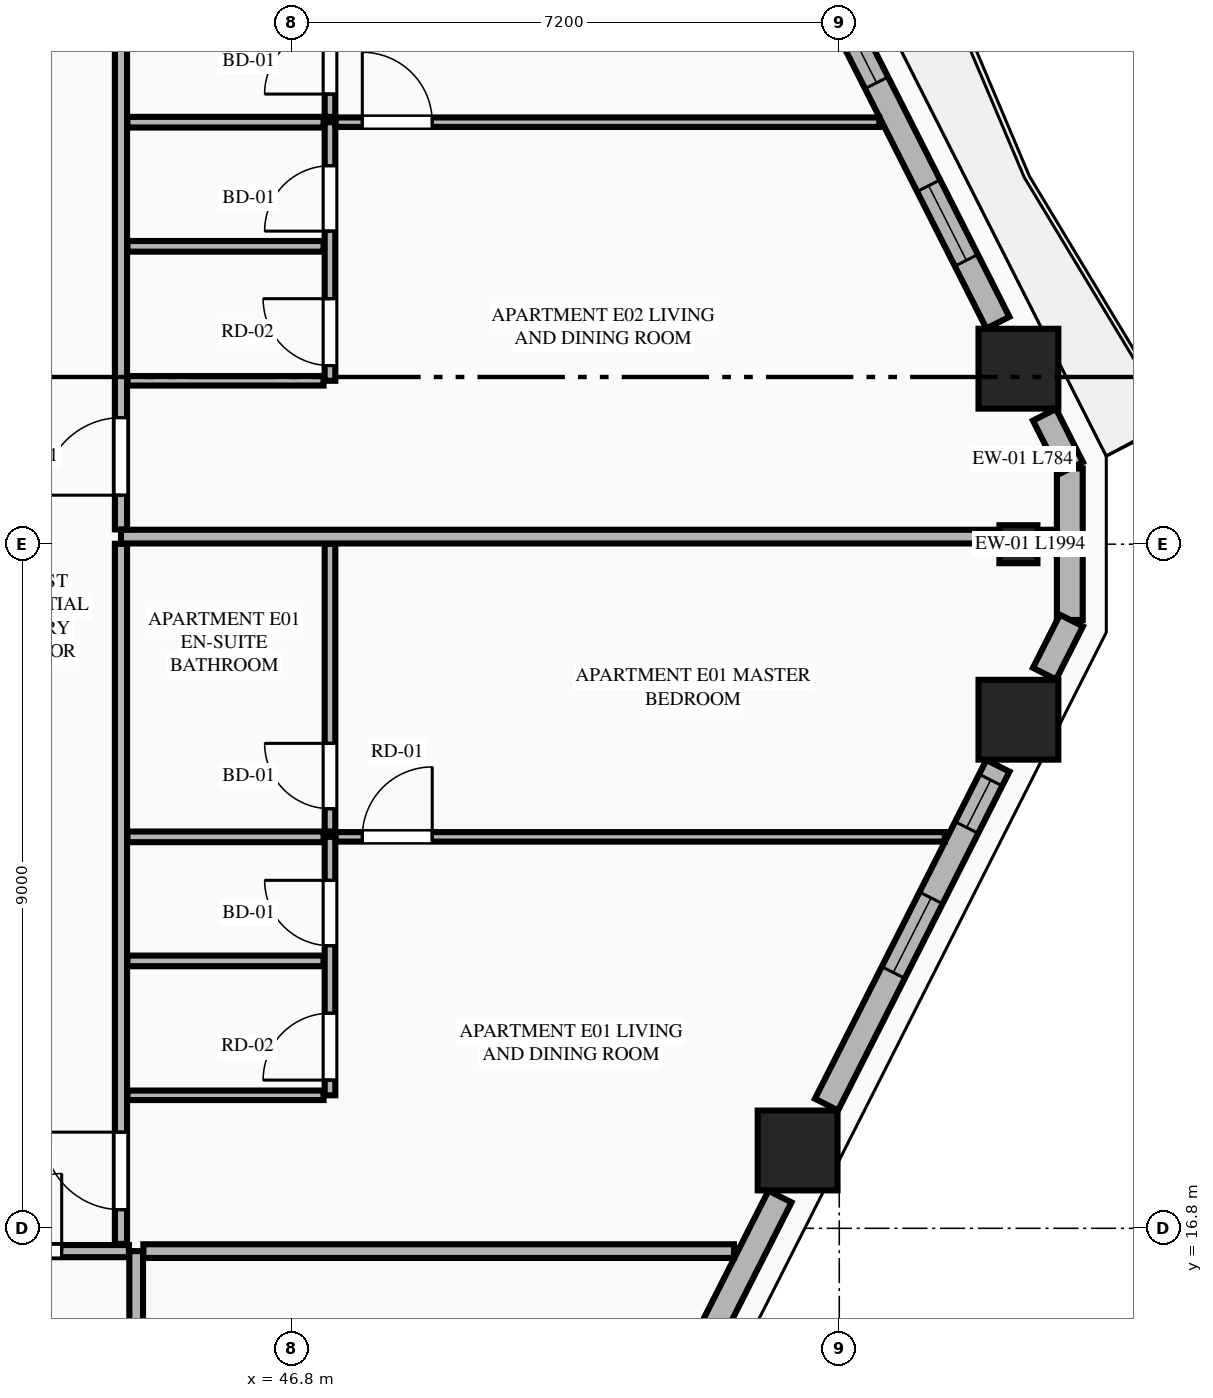
"""IFC4 building model, lengths in metres.
Left out: names, types, materials, properties, quantities, classifications, styles, units other than length and angle.
Written with IfcOpenShell. Run it as: python <this file> out.ifc"""

import sys

from ifc_helpers import new_model, si_unit, direction, frame, frame_2d, origin, origin_2d, place, context, subcontext, project, spatial, rectangle, extrude, element, fill, save


model = new_model("IFC4")
c1 = context("Model", 3, precision=1e-05, world=origin(), true_north=direction((0.0, 1.0)))
c2 = subcontext(c1, "Body", "Model", "MODEL_VIEW")
j1 = project(units=[si_unit("LENGTHUNIT", "METRE"), si_unit("PLANEANGLEUNIT", "RADIAN")], contexts=[c1])
p1 = place(None, origin())
s1 = spatial("IfcSite", under=j1, at=p1, CompositionType="ELEMENT")
p2 = place(p1, origin())
s2 = spatial("IfcBuilding", under=s1, at=p2, CompositionType="ELEMENT")
p3 = place(p2, frame((0.0, 0.0, 133.9)))
s3 = spatial("IfcBuildingStorey", under=s2, at=p3, CompositionType="ELEMENT", Elevation=133.9)
for number, where, z_axis, x_axis in (
    (1, (53.452, 17.824, 0.0), (0.0, 0.0, 1.0), (1.0, 0.0, 0.0)),
    (2, (56.357, 23.491, 0.0), (0.0, 0.0, 1.0), (1.0, 0.0, 0.0)),
    (3, (56.357, 28.109, 0.0), (0.0, 0.0, 1.0), (1.0, 0.0, 0.0)),
):
    element("IfcColumn", number, at=place(p3, frame(where, z_axis=z_axis, x_axis=x_axis)), inside=s3, PredefinedType="COLUMN", context=c2, shape_type="SweptSolid", body=[
        extrude(rectangle(XDim=1.05, YDim=1.05, at=origin_2d()), origin(), (0.0, 0.0, 1.0), 3.55),
    ])
p4 = place(p3, frame((56.357, 25.8, 0.0), z_axis=(0.0, 0.0, 1.0), x_axis=(0.0, 1.0, 0.0)))
e4 = element("IfcColumn", 4, at=p4, inside=s3, PredefinedType="PILASTER", context=c2, shape_type="SweptSolid", body=[
    extrude(rectangle(XDim=0.5, YDim=0.35, at=origin_2d()), origin(), (0.0, 0.0, 1.0), 3.55),
])
p5 = place(p3, frame((57.033, 24.803, 0.0), z_axis=(0.0, 0.0, 1.0), x_axis=(0.0, 1.0, 0.0)))
e5 = element("IfcWall", 5, at=p5, inside=s3, PredefinedType="STANDARD", context=c2, shape_type="SweptSolid", body=[
    extrude(rectangle(XDim=1.994, YDim=0.34, at=frame_2d((0.997, 0.0))), origin(), (0.0, 0.0, 1.0), 3.34),
])
p6 = place(p3, frame((50.863, 12.561, 0.0), z_axis=(0.0, 0.0, 1.0), x_axis=(0.451567731634, 0.892236842855, 0.0)))
e6 = element("IfcWall", 6, at=p6, inside=s3, PredefinedType="STANDARD", context=c2, shape_type="SweptSolid", body=[
    extrude(rectangle(XDim=5.219, YDim=0.34, at=frame_2d((2.61, 0.0))), origin(), (0.0, 0.0, 1.0), 2.797),
])
p7 = place(p6, frame((2.06, 0.0, 0.75)))
e7 = element("IfcOpeningElement", 7, at=p7, cuts=e6, PredefinedType="OPENING", context=c2, shape_type="SweptSolid", body=[
    extrude(rectangle(XDim=1.1, YDim=1.897, at=frame_2d((0.55, 0.948))), frame((0.0, 0.18, 0.0), z_axis=(0.0, -1.0, 0.0), x_axis=(1.0, 0.0, 0.0)), (0.0, 0.0, 1.0), 0.36),
])
p8 = place(p3, frame((53.832, 18.428, 0.0), z_axis=(0.0, 0.0, 1.0), x_axis=(0.451431617681, 0.892305718102, 0.0)))
e8 = element("IfcWall", 8, at=p8, inside=s3, PredefinedType="STANDARD", context=c2, shape_type="SweptSolid", body=[
    extrude(rectangle(XDim=4.995, YDim=0.34, at=frame_2d((2.498, 0.0))), origin(), (0.0, 0.0, 1.0), 2.797),
])
p9 = place(p8, frame((1.947, 0.0, 0.75)))
e9 = element("IfcOpeningElement", 9, at=p9, cuts=e8, PredefinedType="OPENING", context=c2, shape_type="SweptSolid", body=[
    extrude(rectangle(XDim=1.1, YDim=1.897, at=frame_2d((0.55, 0.948))), frame((0.0, 0.18, 0.0), z_axis=(0.0, -1.0, 0.0), x_axis=(1.0, 0.0, 0.0)), (0.0, 0.0, 1.0), 0.36),
])
p10 = place(p8, frame((4.085, 0.0, 0.75)))
e10 = element("IfcOpeningElement", 10, at=p10, cuts=e8, PredefinedType="OPENING", context=c2, shape_type="SweptSolid", body=[
    extrude(rectangle(XDim=0.7, YDim=1.897, at=frame_2d((0.35, 0.948))), frame((0.0, 0.18, 0.0), z_axis=(0.0, -1.0, 0.0), x_axis=(1.0, 0.0, 0.0)), (0.0, 0.0, 1.0), 0.36),
])
for number, where, z_axis, x_axis in (
    (11, (56.7, 24.097, 0.0), (0.0, 0.0, 1.0), (0.452, 0.892, 0.0)),
    (12, (57.054, 26.804, 0.0), (0.0, 0.0, 1.0), (-0.452, 0.892, 0.0)),
):
    element("IfcWall", number, at=place(p3, frame(where, z_axis=z_axis, x_axis=x_axis)), inside=s3, PredefinedType="STANDARD", context=c2, shape_type="SweptSolid", body=[
        extrude(rectangle(XDim=0.783, YDim=0.34, at=frame_2d((0.392, 0.0))), origin(), (0.0, 0.0, 1.0), 3.34),
    ])
p11 = place(p3, frame((56.087, 28.715, 0.0), z_axis=(0.0, 0.0, 1.0), x_axis=(-0.451431617681, 0.892305718102, 0.0)))
e13 = element("IfcWall", 13, at=p11, inside=s3, PredefinedType="STANDARD", context=c2, shape_type="SweptSolid", body=[
    extrude(rectangle(XDim=4.995, YDim=0.34, at=frame_2d((2.498, 0.0))), origin(), (0.0, 0.0, 1.0), 2.797),
])
p12 = place(p11, frame((0.919, 0.0, 0.75)))
e14 = element("IfcOpeningElement", 14, at=p12, cuts=e13, PredefinedType="OPENING", context=c2, shape_type="SweptSolid", body=[
    extrude(rectangle(XDim=1.1, YDim=1.897, at=frame_2d((0.55, 0.948))), frame((0.0, 0.18, 0.0), z_axis=(0.0, -1.0, 0.0), x_axis=(1.0, 0.0, 0.0)), (0.0, 0.0, 1.0), 0.36),
])
p13 = place(p11, frame((3.536, 0.0, 0.75)))
e15 = element("IfcOpeningElement", 15, at=p13, cuts=e13, PredefinedType="OPENING", context=c2, shape_type="SweptSolid", body=[
    extrude(rectangle(XDim=1.1, YDim=1.897, at=frame_2d((0.55, 0.948))), frame((0.0, 0.18, 0.0), z_axis=(0.0, -1.0, 0.0), x_axis=(1.0, 0.0, 0.0)), (0.0, 0.0, 1.0), 0.36),
])
p14 = place(p3, frame((44.75, 4.105, 0.0), z_axis=(0.0, 0.0, 1.0), x_axis=(0.0, 1.0, 0.0)))
e16 = element("IfcWall", 16, at=p14, inside=s3, PredefinedType="PARTITIONING", context=c2, shape_type="SweptSolid", body=[
    extrude(rectangle(XDim=12.395, YDim=0.18, at=frame_2d((6.198, 0.0))), origin(), (0.0, 0.0, 1.0), 3.34),
])
p15 = place(p3, frame((28.663, 16.5, 0.0), z_axis=(0.0, 0.0, 1.0), x_axis=(1.0, 0.0, 0.0)))
e17 = element("IfcWall", 17, at=p15, inside=s3, PredefinedType="PARTITIONING", context=c2, shape_type="SweptSolid", body=[
    extrude(rectangle(XDim=15.992, YDim=0.16, at=frame_2d((7.996, 0.0))), origin(), (0.0, 0.0, 1.0), 3.34),
])
p16 = place(p15, frame((14.087, 0.0, 0.0)))
e18 = element("IfcOpeningElement", 18, at=p16, cuts=e17, PredefinedType="OPENING", context=c2, shape_type="SweptSolid", body=[
    extrude(rectangle(XDim=1.02, YDim=2.25, at=frame_2d((0.51, 1.125))), frame((0.0, 0.09, 0.0), z_axis=(0.0, -1.0, 0.0), x_axis=(1.0, 0.0, 0.0)), (0.0, 0.0, 1.0), 0.18),
])
p17 = place(p3, frame((44.845, 16.5, 0.0), z_axis=(0.0, 0.0, 1.0), x_axis=(1.0, 0.0, 0.0)))
e19 = element("IfcWall", 19, at=p17, inside=s3, PredefinedType="PARTITIONING", context=c2, shape_type="SweptSolid", body=[
    extrude(rectangle(XDim=7.77, YDim=0.18, at=frame_2d((3.885, 0.0))), origin(), (0.0, 0.0, 1.0), 3.34),
])
p18 = place(p3, frame((44.55, 16.595, 0.0), z_axis=(0.0, 0.0, 1.0), x_axis=(0.0, 1.0, 0.0)))
e20 = element("IfcWall", 20, at=p18, inside=s3, PredefinedType="PARTITIONING", context=c2, shape_type="SweptSolid", body=[
    extrude(rectangle(XDim=9.21, YDim=0.16, at=frame_2d((4.605, 0.0))), origin(), (0.0, 0.0, 1.0), 3.34),
])
p19 = place(p18, frame((0.45, 0.0, 0.0)))
e21 = element("IfcOpeningElement", 21, at=p19, cuts=e20, PredefinedType="OPENING", context=c2, shape_type="SweptSolid", body=[
    extrude(rectangle(XDim=1.02, YDim=2.25, at=frame_2d((0.51, 1.125))), frame((0.0, 0.09, 0.0), z_axis=(0.0, -1.0, 0.0), x_axis=(1.0, 0.0, 0.0)), (0.0, 0.0, 1.0), 0.18),
])
p20 = place(p3, frame((44.635, 18.55, 0.0), z_axis=(0.0, 0.0, 1.0), x_axis=(1.0, 0.0, 0.0)))
e22 = element("IfcWall", 22, at=p20, inside=s3, PredefinedType="PARTITIONING", context=c2, shape_type="SweptSolid", body=[
    extrude(rectangle(XDim=2.58, YDim=0.125, at=frame_2d((1.29, 0.0))), origin(), (0.0, 0.0, 1.0), 2.722),
])
p21 = place(p3, frame((47.3, 18.55, 0.0), z_axis=(0.0, 0.0, 1.0), x_axis=(0.0, 1.0, 0.0)))
e23 = element("IfcWall", 23, at=p21, inside=s3, PredefinedType="PLUMBINGWALL", context=c2, shape_type="SweptSolid", body=[
    extrude(rectangle(XDim=3.4, YDim=0.14, at=frame_2d((1.7, 0.0))), origin(), (0.0, 0.0, 1.0), 3.34),
])
p22 = place(p21, frame((0.2, 0.0, 0.0)))
e24 = element("IfcOpeningElement", 24, at=p22, cuts=e23, PredefinedType="OPENING", context=c2, shape_type="SweptSolid", body=[
    extrude(rectangle(XDim=0.88, YDim=2.15, at=frame_2d((0.44, 1.075))), frame((0.0, 0.08, 0.0), z_axis=(0.0, -1.0, 0.0), x_axis=(1.0, 0.0, 0.0)), (0.0, 0.0, 1.0), 0.16),
])
p23 = place(p21, frame((1.968, 0.0, 0.0)))
e25 = element("IfcOpeningElement", 25, at=p23, cuts=e23, PredefinedType="OPENING", context=c2, shape_type="SweptSolid", body=[
    extrude(rectangle(XDim=0.86, YDim=2.1, at=frame_2d((0.43, 1.05))), frame((0.0, 0.08, 0.0), z_axis=(0.0, -1.0, 0.0), x_axis=(1.0, 0.0, 0.0)), (0.0, 0.0, 1.0), 0.16),
])
p24 = place(p3, frame((47.3, 22.02, 0.0), z_axis=(0.0, 0.0, 1.0), x_axis=(0.0, 1.0, 0.0)))
e26 = element("IfcWall", 26, at=p24, inside=s3, PredefinedType="PLUMBINGWALL", context=c2, shape_type="SweptSolid", body=[
    extrude(rectangle(XDim=3.785, YDim=0.14, at=frame_2d((1.893, 0.0))), origin(), (0.0, 0.0, 1.0), 3.34),
])
p25 = place(p24, frame((0.3, 0.0, 0.0)))
e27 = element("IfcOpeningElement", 27, at=p25, cuts=e26, PredefinedType="OPENING", context=c2, shape_type="SweptSolid", body=[
    extrude(rectangle(XDim=0.86, YDim=2.1, at=frame_2d((0.43, 1.05))), frame((0.0, 0.08, 0.0), z_axis=(0.0, -1.0, 0.0), x_axis=(1.0, 0.0, 0.0)), (0.0, 0.0, 1.0), 0.16),
])
p26 = place(p3, frame((44.635, 21.95, 0.0), z_axis=(0.0, 0.0, 1.0), x_axis=(1.0, 0.0, 0.0)))
e28 = element("IfcWall", 28, at=p26, inside=s3, PredefinedType="PLUMBINGWALL", context=c2, shape_type="SweptSolid", body=[
    extrude(rectangle(XDim=2.58, YDim=0.14, at=frame_2d((1.29, 0.0))), origin(), (0.0, 0.0, 1.0), 3.34),
])
p27 = place(p3, frame((47.375, 21.95, 0.0), z_axis=(0.0, 0.0, 1.0), x_axis=(1.0, 0.0, 0.0)))
e29 = element("IfcWall", 29, at=p27, inside=s3, PredefinedType="PARTITIONING", context=c2, shape_type="SweptSolid", body=[
    extrude(rectangle(XDim=8.013, YDim=0.125, at=frame_2d((4.006, 0.0))), origin(), (0.0, 0.0, 1.0), 3.34),
])
p28 = place(p27, frame((0.35, 0.0, 0.0)))
e30 = element("IfcOpeningElement", 30, at=p28, cuts=e29, PredefinedType="OPENING", context=c2, shape_type="SweptSolid", body=[
    extrude(rectangle(XDim=0.92, YDim=2.15, at=frame_2d((0.46, 1.075))), frame((0.0, 0.073, 0.0), z_axis=(0.0, -1.0, 0.0), x_axis=(1.0, 0.0, 0.0)), (0.0, 0.0, 1.0), 0.145),
])
p29 = place(p3, frame((44.635, 20.318, 0.0), z_axis=(0.0, 0.0, 1.0), x_axis=(1.0, 0.0, 0.0)))
e31 = element("IfcWall", 31, at=p29, inside=s3, PredefinedType="PLUMBINGWALL", context=c2, shape_type="SweptSolid", body=[
    extrude(rectangle(XDim=2.58, YDim=0.14, at=frame_2d((1.29, 0.0))), origin(), (0.0, 0.0, 1.0), 3.34),
])
p30 = place(p3, frame((44.55, 25.9, 0.0), z_axis=(0.0, 0.0, 1.0), x_axis=(1.0, 0.0, 0.0)))
e32 = element("IfcWall", 32, at=p30, inside=s3, PredefinedType="PARTITIONING", context=c2, shape_type="SweptSolid", body=[
    extrude(rectangle(XDim=12.308, YDim=0.18, at=frame_2d((6.154, 0.0))), origin(), (0.0, 0.0, 1.0), 3.34),
])
p31 = place(p3, frame((44.55, 25.995, 0.0), z_axis=(0.0, 0.0, 1.0), x_axis=(0.0, 1.0, 0.0)))
e33 = element("IfcWall", 33, at=p31, inside=s3, PredefinedType="PARTITIONING", context=c2, shape_type="SweptSolid", body=[
    extrude(rectangle(XDim=9.21, YDim=0.16, at=frame_2d((4.605, 0.0))), origin(), (0.0, 0.0, 1.0), 3.34),
])
p32 = place(p31, frame((0.45, 0.0, 0.0)))
e34 = element("IfcOpeningElement", 34, at=p32, cuts=e33, PredefinedType="OPENING", context=c2, shape_type="SweptSolid", body=[
    extrude(rectangle(XDim=1.02, YDim=2.25, at=frame_2d((0.51, 1.125))), frame((0.0, 0.09, 0.0), z_axis=(0.0, -1.0, 0.0), x_axis=(1.0, 0.0, 0.0)), (0.0, 0.0, 1.0), 0.18),
])
p33 = place(p3, frame((44.635, 27.95, 0.0), z_axis=(0.0, 0.0, 1.0), x_axis=(1.0, 0.0, 0.0)))
e35 = element("IfcWall", 35, at=p33, inside=s3, PredefinedType="PARTITIONING", context=c2, shape_type="SweptSolid", body=[
    extrude(rectangle(XDim=2.58, YDim=0.125, at=frame_2d((1.29, 0.0))), origin(), (0.0, 0.0, 1.0), 3.34),
])
p34 = place(p3, frame((47.3, 27.95, 0.0), z_axis=(0.0, 0.0, 1.0), x_axis=(0.0, 1.0, 0.0)))
e36 = element("IfcWall", 36, at=p34, inside=s3, PredefinedType="PLUMBINGWALL", context=c2, shape_type="SweptSolid", body=[
    extrude(rectangle(XDim=3.402, YDim=0.14, at=frame_2d((1.701, 0.0))), origin(), (0.0, 0.0, 1.0), 3.34),
])
p35 = place(p34, frame((0.2, 0.0, 0.0)))
e37 = element("IfcOpeningElement", 37, at=p35, cuts=e36, PredefinedType="OPENING", context=c2, shape_type="SweptSolid", body=[
    extrude(rectangle(XDim=0.88, YDim=2.15, at=frame_2d((0.44, 1.075))), frame((0.0, 0.08, 0.0), z_axis=(0.0, -1.0, 0.0), x_axis=(1.0, 0.0, 0.0)), (0.0, 0.0, 1.0), 0.16),
])
p36 = place(p34, frame((1.969, 0.0, 0.0)))
e38 = element("IfcOpeningElement", 38, at=p36, cuts=e36, PredefinedType="OPENING", context=c2, shape_type="SweptSolid", body=[
    extrude(rectangle(XDim=0.86, YDim=2.1, at=frame_2d((0.43, 1.05))), frame((0.0, 0.08, 0.0), z_axis=(0.0, -1.0, 0.0), x_axis=(1.0, 0.0, 0.0)), (0.0, 0.0, 1.0), 0.16),
])
p37 = place(p3, frame((47.3, 31.422, 0.0), z_axis=(0.0, 0.0, 1.0), x_axis=(0.0, 1.0, 0.0)))
e39 = element("IfcWall", 39, at=p37, inside=s3, PredefinedType="PLUMBINGWALL", context=c2, shape_type="SweptSolid", body=[
    extrude(rectangle(XDim=3.783, YDim=0.14, at=frame_2d((1.892, 0.0))), origin(), (0.0, 0.0, 1.0), 3.34),
])
p38 = place(p37, frame((0.3, 0.0, 0.0)))
e40 = element("IfcOpeningElement", 40, at=p38, cuts=e39, PredefinedType="OPENING", context=c2, shape_type="SweptSolid", body=[
    extrude(rectangle(XDim=0.86, YDim=2.1, at=frame_2d((0.43, 1.05))), frame((0.0, 0.08, 0.0), z_axis=(0.0, -1.0, 0.0), x_axis=(1.0, 0.0, 0.0)), (0.0, 0.0, 1.0), 0.16),
])
p39 = place(p3, frame((44.635, 31.352, 0.0), z_axis=(0.0, 0.0, 1.0), x_axis=(1.0, 0.0, 0.0)))
e41 = element("IfcWall", 41, at=p39, inside=s3, PredefinedType="PLUMBINGWALL", context=c2, shape_type="SweptSolid", body=[
    extrude(rectangle(XDim=2.58, YDim=0.14, at=frame_2d((1.29, 0.0))), origin(), (0.0, 0.0, 1.0), 3.34),
])
p40 = place(p3, frame((47.375, 31.352, 0.0), z_axis=(0.0, 0.0, 1.0), x_axis=(1.0, 0.0, 0.0)))
e42 = element("IfcWall", 42, at=p40, inside=s3, PredefinedType="PARTITIONING", context=c2, shape_type="SweptSolid", body=[
    extrude(rectangle(XDim=7.152, YDim=0.125, at=frame_2d((3.576, 0.0))), origin(), (0.0, 0.0, 1.0), 3.34),
])
p41 = place(p40, frame((0.35, 0.0, 0.0)))
e43 = element("IfcOpeningElement", 43, at=p41, cuts=e42, PredefinedType="OPENING", context=c2, shape_type="SweptSolid", body=[
    extrude(rectangle(XDim=0.92, YDim=2.15, at=frame_2d((0.46, 1.075))), frame((0.0, 0.073, 0.0), z_axis=(0.0, -1.0, 0.0), x_axis=(1.0, 0.0, 0.0)), (0.0, 0.0, 1.0), 0.145),
])
p42 = place(p3, frame((44.635, 29.719, 0.0), z_axis=(0.0, 0.0, 1.0), x_axis=(1.0, 0.0, 0.0)))
e44 = element("IfcWall", 44, at=p42, inside=s3, PredefinedType="PLUMBINGWALL", context=c2, shape_type="SweptSolid", body=[
    extrude(rectangle(XDim=2.58, YDim=0.14, at=frame_2d((1.29, 0.0))), origin(), (0.0, 0.0, 1.0), 3.34),
])
p43 = place(p9, origin())
e45 = element("IfcWindow", 45, at=p43, inside=s3, PartitioningType="SINGLE_PANEL", PredefinedType="WINDOW", context=c2, shape_type="SweptSolid", body=[
    extrude(rectangle(XDim=1.1, YDim=1.897, at=frame_2d((0.55, 0.948))), frame((0.0, 0.03, 0.0), z_axis=(0.0, -1.0, 0.0), x_axis=(1.0, 0.0, 0.0)), (0.0, 0.0, 1.0), 0.06),
])
fill(e9, e45)
p44 = place(p12, origin())
e46 = element("IfcWindow", 46, at=p44, inside=s3, PartitioningType="SINGLE_PANEL", PredefinedType="WINDOW", context=c2, shape_type="SweptSolid", body=[
    extrude(rectangle(XDim=1.1, YDim=1.897, at=frame_2d((0.55, 0.948))), frame((0.0, 0.03, 0.0), z_axis=(0.0, -1.0, 0.0), x_axis=(1.0, 0.0, 0.0)), (0.0, 0.0, 1.0), 0.06),
])
fill(e14, e46)
p45 = place(p16, origin())
e47 = element("IfcDoor", 47, at=p45, inside=s3, OperationType="SINGLE_SWING_RIGHT", PredefinedType="DOOR", context=c2, shape_type="SweptSolid", body=[
    extrude(rectangle(XDim=1.02, YDim=2.25, at=frame_2d((0.51, 1.125))), frame((0.0, 0.025, 0.0), z_axis=(0.0, -1.0, 0.0), x_axis=(1.0, 0.0, 0.0)), (0.0, 0.0, 1.0), 0.05),
])
fill(e18, e47)
p46 = place(p22, origin())
e48 = element("IfcDoor", 48, at=p46, inside=s3, OperationType="SINGLE_SWING_LEFT", PredefinedType="DOOR", context=c2, shape_type="SweptSolid", body=[
    extrude(rectangle(XDim=0.88, YDim=2.15, at=frame_2d((0.44, 1.075))), frame((0.0, 0.025, 0.0), z_axis=(0.0, -1.0, 0.0), x_axis=(1.0, 0.0, 0.0)), (0.0, 0.0, 1.0), 0.05),
])
fill(e24, e48)
p47 = place(p23, origin())
e49 = element("IfcDoor", 49, at=p47, inside=s3, OperationType="SINGLE_SWING_RIGHT", PredefinedType="DOOR", context=c2, shape_type="SweptSolid", body=[
    extrude(rectangle(XDim=0.86, YDim=2.1, at=frame_2d((0.43, 1.05))), frame((0.0, 0.025, 0.0), z_axis=(0.0, -1.0, 0.0), x_axis=(1.0, 0.0, 0.0)), (0.0, 0.0, 1.0), 0.05),
])
fill(e25, e49)
p48 = place(p25, origin())
e50 = element("IfcDoor", 50, at=p48, inside=s3, OperationType="SINGLE_SWING_RIGHT", PredefinedType="DOOR", context=c2, shape_type="SweptSolid", body=[
    extrude(rectangle(XDim=0.86, YDim=2.1, at=frame_2d((0.43, 1.05))), frame((0.0, 0.025, 0.0), z_axis=(0.0, -1.0, 0.0), x_axis=(1.0, 0.0, 0.0)), (0.0, 0.0, 1.0), 0.05),
])
fill(e27, e50)
p49 = place(p19, origin())
e51 = element("IfcDoor", 51, at=p49, inside=s3, OperationType="SINGLE_SWING_RIGHT", PredefinedType="DOOR", context=c2, shape_type="SweptSolid", body=[
    extrude(rectangle(XDim=1.02, YDim=2.25, at=frame_2d((0.51, 1.125))), frame((0.0, 0.025, 0.0), z_axis=(0.0, -1.0, 0.0), x_axis=(1.0, 0.0, 0.0)), (0.0, 0.0, 1.0), 0.05),
])
fill(e21, e51)
p50 = place(p28, origin())
e52 = element("IfcDoor", 52, at=p50, inside=s3, OperationType="SINGLE_SWING_RIGHT", PredefinedType="DOOR", context=c2, shape_type="SweptSolid", body=[
    extrude(rectangle(XDim=0.92, YDim=2.15, at=frame_2d((0.46, 1.075))), frame((0.0, 0.025, 0.0), z_axis=(0.0, -1.0, 0.0), x_axis=(1.0, 0.0, 0.0)), (0.0, 0.0, 1.0), 0.05),
])
fill(e30, e52)
p51 = place(p35, origin())
e53 = element("IfcDoor", 53, at=p51, inside=s3, OperationType="SINGLE_SWING_RIGHT", PredefinedType="DOOR", context=c2, shape_type="SweptSolid", body=[
    extrude(rectangle(XDim=0.88, YDim=2.15, at=frame_2d((0.44, 1.075))), frame((0.0, 0.025, 0.0), z_axis=(0.0, -1.0, 0.0), x_axis=(1.0, 0.0, 0.0)), (0.0, 0.0, 1.0), 0.05),
])
fill(e37, e53)
p52 = place(p36, origin())
e54 = element("IfcDoor", 54, at=p52, inside=s3, OperationType="SINGLE_SWING_LEFT", PredefinedType="DOOR", context=c2, shape_type="SweptSolid", body=[
    extrude(rectangle(XDim=0.86, YDim=2.1, at=frame_2d((0.43, 1.05))), frame((0.0, 0.025, 0.0), z_axis=(0.0, -1.0, 0.0), x_axis=(1.0, 0.0, 0.0)), (0.0, 0.0, 1.0), 0.05),
])
fill(e38, e54)
p53 = place(p38, origin())
e55 = element("IfcDoor", 55, at=p53, inside=s3, OperationType="SINGLE_SWING_LEFT", PredefinedType="DOOR", context=c2, shape_type="SweptSolid", body=[
    extrude(rectangle(XDim=0.86, YDim=2.1, at=frame_2d((0.43, 1.05))), frame((0.0, 0.025, 0.0), z_axis=(0.0, -1.0, 0.0), x_axis=(1.0, 0.0, 0.0)), (0.0, 0.0, 1.0), 0.05),
])
fill(e40, e55)
p54 = place(p32, origin())
e56 = element("IfcDoor", 56, at=p54, inside=s3, OperationType="SINGLE_SWING_LEFT", PredefinedType="DOOR", context=c2, shape_type="SweptSolid", body=[
    extrude(rectangle(XDim=1.02, YDim=2.25, at=frame_2d((0.51, 1.125))), frame((0.0, 0.025, 0.0), z_axis=(0.0, -1.0, 0.0), x_axis=(1.0, 0.0, 0.0)), (0.0, 0.0, 1.0), 0.05),
])
fill(e34, e56)
p55 = place(p41, origin())
e57 = element("IfcDoor", 57, at=p55, inside=s3, OperationType="SINGLE_SWING_LEFT", PredefinedType="DOOR", context=c2, shape_type="SweptSolid", body=[
    extrude(rectangle(XDim=0.92, YDim=2.15, at=frame_2d((0.46, 1.075))), frame((0.0, 0.025, 0.0), z_axis=(0.0, -1.0, 0.0), x_axis=(1.0, 0.0, 0.0)), (0.0, 0.0, 1.0), 0.05),
])
fill(e43, e57)
p56 = place(p13, origin())
e58 = element("IfcWindow", 58, at=p56, inside=s3, PartitioningType="SINGLE_PANEL", PredefinedType="WINDOW", context=c2, shape_type="SweptSolid", body=[
    extrude(rectangle(XDim=1.1, YDim=1.897, at=frame_2d((0.55, 0.948))), frame((0.0, 0.03, 0.0), z_axis=(0.0, -1.0, 0.0), x_axis=(1.0, 0.0, 0.0)), (0.0, 0.0, 1.0), 0.06),
])
fill(e15, e58)
p57 = place(p10, origin())
e59 = element("IfcWindow", 59, at=p57, inside=s3, PartitioningType="SINGLE_PANEL", PredefinedType="WINDOW", context=c2, shape_type="SweptSolid", body=[
    extrude(rectangle(XDim=0.7, YDim=1.897, at=frame_2d((0.35, 0.948))), frame((0.0, 0.03, 0.0), z_axis=(0.0, -1.0, 0.0), x_axis=(1.0, 0.0, 0.0)), (0.0, 0.0, 1.0), 0.06),
])
fill(e10, e59)
save(model, sys.argv[1])
